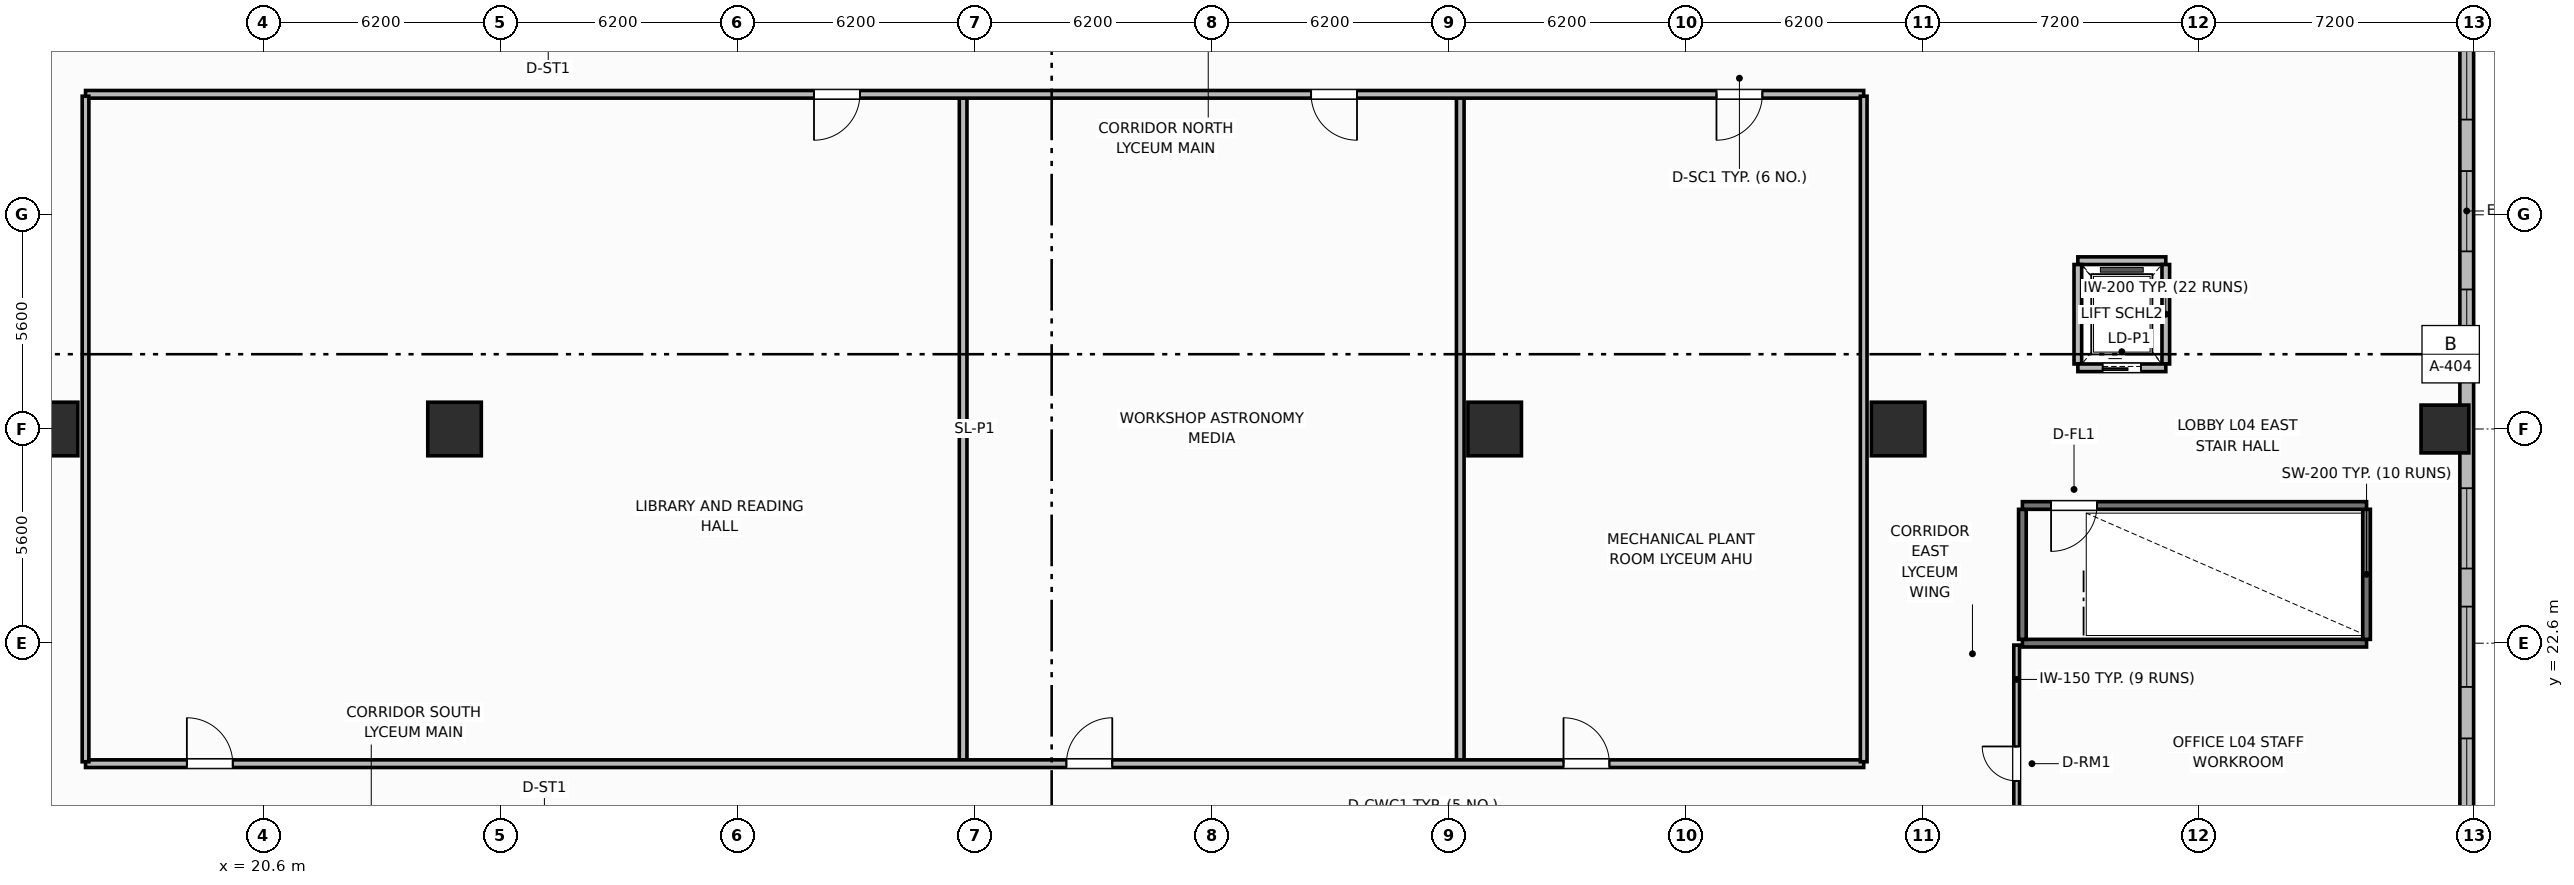
"""IFC4 building model, lengths in metres.
Left out: names, types, materials, properties, quantities, classifications, styles, units other than length and angle.
Written with IfcOpenShell. Run it as: python <this file> out.ifc"""

import sys

from ifc_helpers import new_model, si_unit, direction, frame, frame_2d, origin, origin_2d, place, context, subcontext, project, spatial, rectangle, extrude, element, fill, save


model = new_model("IFC4")
c1 = context("Model", 3, precision=1e-05, world=origin(), true_north=direction((0.0, 1.0)))
c2 = subcontext(c1, "Body", "Model", "MODEL_VIEW")
j1 = project(units=[si_unit("LENGTHUNIT", "METRE"), si_unit("PLANEANGLEUNIT", "RADIAN")], contexts=[c1])
p1 = place(None, origin())
s1 = spatial("IfcSite", under=j1, at=p1, CompositionType="ELEMENT")
p2 = place(p1, origin())
s2 = spatial("IfcBuilding", under=s1, at=p2, CompositionType="ELEMENT")
p3 = place(p2, frame((0.0, 0.0, 20.1)))
s3 = spatial("IfcBuildingStorey", under=s2, at=p3, CompositionType="ELEMENT", Elevation=20.1)
for number, where, z_axis, x_axis in (
    (1, (25.6, 28.2, 0.0), (0.0, 0.0, 1.0), (1.0, 0.0, 0.0)),
    (2, (52.8, 28.2, 0.0), (0.0, 0.0, 1.0), (1.0, 0.0, 0.0)),
):
    element("IfcColumn", number, at=place(p3, frame(where, z_axis=z_axis, x_axis=x_axis)), inside=s3, PredefinedType="COLUMN", context=c2, shape_type="SweptSolid", body=[
        extrude(rectangle(XDim=1.4, YDim=1.4, at=origin_2d()), origin(), (0.0, 0.0, 1.0), 4.5),
    ])
p4 = place(p3, frame((77.65, 28.2, 0.0), z_axis=(0.0, 0.0, 1.0), x_axis=(1.0, 0.0, 0.0)))
e3 = element("IfcColumn", 3, at=p4, inside=s3, PredefinedType="COLUMN", context=c2, shape_type="SweptSolid", body=[
    extrude(rectangle(XDim=1.25, YDim=1.25, at=origin_2d()), origin(), (0.0, 0.0, 1.0), 4.5),
])
for number, where, z_axis, x_axis in (
    (4, (15.05, 28.2, 0.0), (0.0, 0.0, 1.0), (1.0, 0.0, 0.0)),
    (5, (63.35, 28.2, 0.0), (0.0, 0.0, 1.0), (1.0, 0.0, 0.0)),
):
    element("IfcColumn", number, at=place(p3, frame(where, z_axis=z_axis, x_axis=x_axis)), inside=s3, PredefinedType="COLUMN", context=c2, shape_type="SweptSolid", body=[
        extrude(rectangle(XDim=1.4, YDim=1.4, at=origin_2d()), origin(), (0.0, 0.0, 1.0), 4.5),
    ])
p5 = place(p3, frame((78.22, 0.98, 0.0), z_axis=(0.0, 0.0, 1.0), x_axis=(0.0, 1.0, 0.0)))
e6 = element("IfcWall", 6, at=p5, inside=s3, PredefinedType="SOLIDWALL", context=c2, shape_type="SweptSolid", body=[
    extrude(rectangle(XDim=54.44, YDim=0.36, at=frame_2d((27.22, 0.0))), origin(), (0.0, 0.0, 1.0), 2.3),
])
p6 = place(p5, frame((1.498, 0.0, 0.3)))
e7 = element("IfcOpeningElement", 7, at=p6, cuts=e6, PredefinedType="OPENING", context=c2, shape_type="SweptSolid", body=[
    extrude(rectangle(XDim=2.1, YDim=2.2, at=frame_2d((1.05, 1.1))), frame((0.0, 0.19, 0.0), z_axis=(0.0, -1.0, 0.0), x_axis=(1.0, 0.0, 0.0)), (0.0, 0.0, 1.0), 0.38),
])
p7 = place(p5, frame((5.294, 0.0, 0.3)))
e8 = element("IfcOpeningElement", 8, at=p7, cuts=e6, PredefinedType="OPENING", context=c2, shape_type="SweptSolid", body=[
    extrude(rectangle(XDim=2.1, YDim=2.2, at=frame_2d((1.05, 1.1))), frame((0.0, 0.19, 0.0), z_axis=(0.0, -1.0, 0.0), x_axis=(1.0, 0.0, 0.0)), (0.0, 0.0, 1.0), 0.38),
])
p8 = place(p5, frame((12.185, 0.0, 0.3)))
e9 = element("IfcOpeningElement", 9, at=p8, cuts=e6, PredefinedType="OPENING", context=c2, shape_type="SweptSolid", body=[
    extrude(rectangle(XDim=2.1, YDim=2.2, at=frame_2d((1.05, 1.1))), frame((0.0, 0.19, 0.0), z_axis=(0.0, -1.0, 0.0), x_axis=(1.0, 0.0, 0.0)), (0.0, 0.0, 1.0), 0.38),
])
p9 = place(p5, frame((17.031, 0.0, 0.3)))
e10 = element("IfcOpeningElement", 10, at=p9, cuts=e6, PredefinedType="OPENING", context=c2, shape_type="SweptSolid", body=[
    extrude(rectangle(XDim=2.1, YDim=2.2, at=frame_2d((1.05, 1.1))), frame((0.0, 0.19, 0.0), z_axis=(0.0, -1.0, 0.0), x_axis=(1.0, 0.0, 0.0)), (0.0, 0.0, 1.0), 0.38),
])
p10 = place(p5, frame((20.476, 0.0, 0.3)))
e11 = element("IfcOpeningElement", 11, at=p10, cuts=e6, PredefinedType="OPENING", context=c2, shape_type="SweptSolid", body=[
    extrude(rectangle(XDim=2.1, YDim=2.2, at=frame_2d((1.05, 1.1))), frame((0.0, 0.19, 0.0), z_axis=(0.0, -1.0, 0.0), x_axis=(1.0, 0.0, 0.0)), (0.0, 0.0, 1.0), 0.38),
])
p11 = place(p5, frame((23.572, 0.0, 0.3)))
e12 = element("IfcOpeningElement", 12, at=p11, cuts=e6, PredefinedType="OPENING", context=c2, shape_type="SweptSolid", body=[
    extrude(rectangle(XDim=2.1, YDim=2.2, at=frame_2d((1.05, 1.1))), frame((0.0, 0.19, 0.0), z_axis=(0.0, -1.0, 0.0), x_axis=(1.0, 0.0, 0.0)), (0.0, 0.0, 1.0), 0.38),
])
p12 = place(p5, frame((28.768, 0.0, 0.3)))
e13 = element("IfcOpeningElement", 13, at=p12, cuts=e6, PredefinedType="OPENING", context=c2, shape_type="SweptSolid", body=[
    extrude(rectangle(XDim=2.1, YDim=2.2, at=frame_2d((1.05, 1.1))), frame((0.0, 0.19, 0.0), z_axis=(0.0, -1.0, 0.0), x_axis=(1.0, 0.0, 0.0)), (0.0, 0.0, 1.0), 0.38),
])
p13 = place(p5, frame((31.864, 0.0, 0.3)))
e14 = element("IfcOpeningElement", 14, at=p13, cuts=e6, PredefinedType="OPENING", context=c2, shape_type="SweptSolid", body=[
    extrude(rectangle(XDim=2.1, YDim=2.2, at=frame_2d((1.05, 1.1))), frame((0.0, 0.19, 0.0), z_axis=(0.0, -1.0, 0.0), x_axis=(1.0, 0.0, 0.0)), (0.0, 0.0, 1.0), 0.38),
])
p14 = place(p5, frame((35.309, 0.0, 0.3)))
e15 = element("IfcOpeningElement", 15, at=p14, cuts=e6, PredefinedType="OPENING", context=c2, shape_type="SweptSolid", body=[
    extrude(rectangle(XDim=2.1, YDim=2.2, at=frame_2d((1.05, 1.1))), frame((0.0, 0.19, 0.0), z_axis=(0.0, -1.0, 0.0), x_axis=(1.0, 0.0, 0.0)), (0.0, 0.0, 1.0), 0.38),
])
p15 = place(p5, frame((40.155, 0.0, 0.3)))
e16 = element("IfcOpeningElement", 16, at=p15, cuts=e6, PredefinedType="OPENING", context=c2, shape_type="SweptSolid", body=[
    extrude(rectangle(XDim=2.1, YDim=2.2, at=frame_2d((1.05, 1.1))), frame((0.0, 0.19, 0.0), z_axis=(0.0, -1.0, 0.0), x_axis=(1.0, 0.0, 0.0)), (0.0, 0.0, 1.0), 0.38),
])
p16 = place(p5, frame((47.046, 0.0, 0.3)))
e17 = element("IfcOpeningElement", 17, at=p16, cuts=e6, PredefinedType="OPENING", context=c2, shape_type="SweptSolid", body=[
    extrude(rectangle(XDim=2.1, YDim=2.2, at=frame_2d((1.05, 1.1))), frame((0.0, 0.19, 0.0), z_axis=(0.0, -1.0, 0.0), x_axis=(1.0, 0.0, 0.0)), (0.0, 0.0, 1.0), 0.38),
])
p17 = place(p5, frame((50.842, 0.0, 0.3)))
e18 = element("IfcOpeningElement", 18, at=p17, cuts=e6, PredefinedType="OPENING", context=c2, shape_type="SweptSolid", body=[
    extrude(rectangle(XDim=2.1, YDim=2.2, at=frame_2d((1.05, 1.1))), frame((0.0, 0.19, 0.0), z_axis=(0.0, -1.0, 0.0), x_axis=(1.0, 0.0, 0.0)), (0.0, 0.0, 1.0), 0.38),
])
p18 = place(p3, frame((66.6, 22.6, 0.0), z_axis=(0.0, 0.0, 1.0), x_axis=(1.0, 0.0, 0.0)))
e19 = element("IfcWall", 19, at=p18, inside=s3, PredefinedType="SHEAR", context=c2, shape_type="SweptSolid", body=[
    extrude(rectangle(XDim=9.0, YDim=0.2, at=frame_2d((4.5, 0.0))), origin(), (0.0, 0.0, 1.0), 4.5),
])
for number, where, z_axis, x_axis in (
    (20, (66.6, 22.7, 0.0), (0.0, 0.0, 1.0), (0.0, 1.0, 0.0)),
    (21, (75.6, 22.7, 0.0), (0.0, 0.0, 1.0), (0.0, 1.0, 0.0)),
):
    element("IfcWall", number, at=place(p3, frame(where, z_axis=z_axis, x_axis=x_axis)), inside=s3, PredefinedType="SHEAR", context=c2, shape_type="SweptSolid", body=[
        extrude(rectangle(XDim=3.4, YDim=0.2, at=frame_2d((1.7, 0.0))), origin(), (0.0, 0.0, 1.0), 4.5),
    ])
p19 = place(p3, frame((75.6, 26.2, 0.0), z_axis=(0.0, 0.0, 1.0), x_axis=(-1.0, 0.0, 0.0)))
e22 = element("IfcWall", 22, at=p19, inside=s3, PredefinedType="SHEAR", context=c2, shape_type="SweptSolid", body=[
    extrude(rectangle(XDim=9.0, YDim=0.2, at=frame_2d((4.5, 0.0))), origin(), (0.0, 0.0, 1.0), 4.5),
])
p20 = place(p19, frame((7.05, 0.0, 0.0)))
e23 = element("IfcOpeningElement", 23, at=p20, cuts=e22, PredefinedType="OPENING", context=c2, shape_type="SweptSolid", body=[
    extrude(rectangle(XDim=1.2, YDim=2.15, at=frame_2d((0.6, 1.075))), frame((0.0, 0.11, 0.0), z_axis=(0.0, -1.0, 0.0), x_axis=(1.0, 0.0, 0.0)), (0.0, 0.0, 1.0), 0.22),
])
p21 = place(p3, frame((68.05, 32.6, 0.0), z_axis=(0.0, 0.0, 1.0), x_axis=(1.0, 0.0, 0.0)))
e24 = element("IfcWall", 24, at=p21, inside=s3, PredefinedType="PARTITIONING", context=c2, shape_type="SweptSolid", body=[
    extrude(rectangle(XDim=2.3, YDim=0.2, at=frame_2d((1.15, 0.0))), origin(), (0.0, 0.0, 1.0), 2.26),
])
for number, where, z_axis, x_axis in (
    (25, (68.05, 29.9, 0.0), (0.0, 0.0, 1.0), (0.0, 1.0, 0.0)),
    (26, (70.35, 29.9, 0.0), (0.0, 0.0, 1.0), (0.0, 1.0, 0.0)),
):
    element("IfcWall", number, at=place(p3, frame(where, z_axis=z_axis, x_axis=x_axis)), inside=s3, PredefinedType="PARTITIONING", context=c2, shape_type="SweptSolid", body=[
        extrude(rectangle(XDim=2.6, YDim=0.2, at=frame_2d((1.3, 0.0))), origin(), (0.0, 0.0, 1.0), 2.26),
    ])
p22 = place(p3, frame((68.05, 29.8, 0.0), z_axis=(0.0, 0.0, 1.0), x_axis=(1.0, 0.0, 0.0)))
e27 = element("IfcWall", 27, at=p22, inside=s3, PredefinedType="PARTITIONING", context=c2, shape_type="SweptSolid", body=[
    extrude(rectangle(XDim=2.3, YDim=0.2, at=frame_2d((1.15, 0.0))), origin(), (0.0, 0.0, 1.0), 2.26),
])
p23 = place(p22, frame((0.65, 0.0, 0.0)))
e28 = element("IfcOpeningElement", 28, at=p23, cuts=e27, PredefinedType="OPENING", context=c2, shape_type="SweptSolid", body=[
    extrude(rectangle(XDim=1.0, YDim=2.15, at=frame_2d((0.5, 1.075))), frame((0.0, 0.11, 0.0), z_axis=(0.0, -1.0, 0.0), x_axis=(1.0, 0.0, 0.0)), (0.0, 0.0, 1.0), 0.22),
])
for number, where, z_axis, x_axis in (
    (29, (38.9, 19.5, 0.0), (0.0, 0.0, 1.0), (0.0, 1.0, 0.0)),
    (30, (51.9, 19.5, 0.0), (0.0, 0.0, 1.0), (0.0, 1.0, 0.0)),
):
    element("IfcWall", number, at=place(p3, frame(where, z_axis=z_axis, x_axis=x_axis)), inside=s3, PredefinedType="PARTITIONING", context=c2, shape_type="SweptSolid", body=[
        extrude(rectangle(XDim=17.4, YDim=0.2, at=frame_2d((8.7, 0.0))), origin(), (0.0, 0.0, 1.0), 2.26),
    ])
p24 = place(p3, frame((15.95, 19.45, 0.0), z_axis=(0.0, 0.0, 1.0), x_axis=(1.0, 0.0, 0.0)))
e31 = element("IfcWall", 31, at=p24, inside=s3, PredefinedType="PARTITIONING", context=c2, shape_type="SweptSolid", body=[
    extrude(rectangle(XDim=46.5, YDim=0.2, at=frame_2d((23.25, 0.0))), origin(), (0.0, 0.0, 1.0), 2.26),
])
p25 = place(p24, frame((2.65, 0.0, 0.0)))
e32 = element("IfcOpeningElement", 32, at=p25, cuts=e31, PredefinedType="OPENING", context=c2, shape_type="SweptSolid", body=[
    extrude(rectangle(XDim=1.2, YDim=2.15, at=frame_2d((0.6, 1.075))), frame((0.0, 0.11, 0.0), z_axis=(0.0, -1.0, 0.0), x_axis=(1.0, 0.0, 0.0)), (0.0, 0.0, 1.0), 0.22),
])
p26 = place(p24, frame((25.65, 0.0, 0.0)))
e33 = element("IfcOpeningElement", 33, at=p26, cuts=e31, PredefinedType="OPENING", context=c2, shape_type="SweptSolid", body=[
    extrude(rectangle(XDim=1.2, YDim=2.15, at=frame_2d((0.6, 1.075))), frame((0.0, 0.11, 0.0), z_axis=(0.0, -1.0, 0.0), x_axis=(1.0, 0.0, 0.0)), (0.0, 0.0, 1.0), 0.22),
])
p27 = place(p24, frame((38.65, 0.0, 0.0)))
e34 = element("IfcOpeningElement", 34, at=p27, cuts=e31, PredefinedType="OPENING", context=c2, shape_type="SweptSolid", body=[
    extrude(rectangle(XDim=1.2, YDim=2.15, at=frame_2d((0.6, 1.075))), frame((0.0, 0.11, 0.0), z_axis=(0.0, -1.0, 0.0), x_axis=(1.0, 0.0, 0.0)), (0.0, 0.0, 1.0), 0.22),
])
p28 = place(p3, frame((62.45, 36.95, 0.0), z_axis=(0.0, 0.0, 1.0), x_axis=(-1.0, 0.0, 0.0)))
e35 = element("IfcWall", 35, at=p28, inside=s3, PredefinedType="PARTITIONING", context=c2, shape_type="SweptSolid", body=[
    extrude(rectangle(XDim=46.5, YDim=0.2, at=frame_2d((23.25, 0.0))), origin(), (0.0, 0.0, 1.0), 2.26),
])
p29 = place(p28, frame((26.25, 0.0, 0.0)))
e36 = element("IfcOpeningElement", 36, at=p29, cuts=e35, PredefinedType="OPENING", context=c2, shape_type="SweptSolid", body=[
    extrude(rectangle(XDim=1.2, YDim=2.15, at=frame_2d((0.6, 1.075))), frame((0.0, 0.11, 0.0), z_axis=(0.0, -1.0, 0.0), x_axis=(1.0, 0.0, 0.0)), (0.0, 0.0, 1.0), 0.22),
])
p30 = place(p28, frame((13.25, 0.0, 0.0)))
e37 = element("IfcOpeningElement", 37, at=p30, cuts=e35, PredefinedType="OPENING", context=c2, shape_type="SweptSolid", body=[
    extrude(rectangle(XDim=1.2, YDim=2.15, at=frame_2d((0.6, 1.075))), frame((0.0, 0.11, 0.0), z_axis=(0.0, -1.0, 0.0), x_axis=(1.0, 0.0, 0.0)), (0.0, 0.0, 1.0), 0.22),
])
p31 = place(p28, frame((2.65, 0.0, 0.0)))
e38 = element("IfcOpeningElement", 38, at=p31, cuts=e35, PredefinedType="OPENING", context=c2, shape_type="SweptSolid", body=[
    extrude(rectangle(XDim=1.2, YDim=2.15, at=frame_2d((0.6, 1.075))), frame((0.0, 0.11, 0.0), z_axis=(0.0, -1.0, 0.0), x_axis=(1.0, 0.0, 0.0)), (0.0, 0.0, 1.0), 0.22),
])
for number, where, z_axis, x_axis in (
    (39, (15.95, 19.5, 0.0), (0.0, 0.0, 1.0), (0.0, 1.0, 0.0)),
    (40, (62.45, 19.5, 0.0), (0.0, 0.0, 1.0), (0.0, 1.0, 0.0)),
):
    element("IfcWall", number, at=place(p3, frame(where, z_axis=z_axis, x_axis=x_axis)), inside=s3, PredefinedType="PARTITIONING", context=c2, shape_type="SweptSolid", body=[
        extrude(rectangle(XDim=17.4, YDim=0.175, at=frame_2d((8.7, 0.0))), origin(), (0.0, 0.0, 1.0), 2.26),
    ])
p32 = place(p3, frame((66.45, 16.9, 0.0), z_axis=(0.0, 0.0, 1.0), x_axis=(0.0, 1.0, 0.0)))
e41 = element("IfcWall", 41, at=p32, inside=s3, PredefinedType="PARTITIONING", context=c2, shape_type="SweptSolid", body=[
    extrude(rectangle(XDim=5.65, YDim=0.15, at=frame_2d((2.825, 0.0))), origin(), (0.0, 0.0, 1.0), 2.26),
])
p33 = place(p32, frame((2.1, 0.0, 0.0)))
e42 = element("IfcOpeningElement", 42, at=p33, cuts=e41, PredefinedType="OPENING", context=c2, shape_type="SweptSolid", body=[
    extrude(rectangle(XDim=0.9, YDim=2.1, at=frame_2d((0.45, 1.05))), frame((0.0, 0.085, 0.0), z_axis=(0.0, -1.0, 0.0), x_axis=(1.0, 0.0, 0.0)), (0.0, 0.0, 1.0), 0.17),
])
p34 = place(p9, origin())
e43 = element("IfcWindow", 43, at=p34, inside=s3, PartitioningType="SINGLE_PANEL", PredefinedType="WINDOW", context=c2, shape_type="SweptSolid", body=[
    extrude(rectangle(XDim=2.1, YDim=2.2, at=frame_2d((1.05, 1.1))), frame((0.0, 0.03, 0.0), z_axis=(0.0, -1.0, 0.0), x_axis=(1.0, 0.0, 0.0)), (0.0, 0.0, 1.0), 0.06),
])
fill(e10, e43)
p35 = place(p10, origin())
e44 = element("IfcWindow", 44, at=p35, inside=s3, PartitioningType="SINGLE_PANEL", PredefinedType="WINDOW", context=c2, shape_type="SweptSolid", body=[
    extrude(rectangle(XDim=2.1, YDim=2.2, at=frame_2d((1.05, 1.1))), frame((0.0, 0.03, 0.0), z_axis=(0.0, -1.0, 0.0), x_axis=(1.0, 0.0, 0.0)), (0.0, 0.0, 1.0), 0.06),
])
fill(e11, e44)
p36 = place(p11, origin())
e45 = element("IfcWindow", 45, at=p36, inside=s3, PartitioningType="SINGLE_PANEL", PredefinedType="WINDOW", context=c2, shape_type="SweptSolid", body=[
    extrude(rectangle(XDim=2.1, YDim=2.2, at=frame_2d((1.05, 1.1))), frame((0.0, 0.03, 0.0), z_axis=(0.0, -1.0, 0.0), x_axis=(1.0, 0.0, 0.0)), (0.0, 0.0, 1.0), 0.06),
])
fill(e12, e45)
p37 = place(p12, origin())
e46 = element("IfcWindow", 46, at=p37, inside=s3, PartitioningType="SINGLE_PANEL", PredefinedType="WINDOW", context=c2, shape_type="SweptSolid", body=[
    extrude(rectangle(XDim=2.1, YDim=2.2, at=frame_2d((1.05, 1.1))), frame((0.0, 0.03, 0.0), z_axis=(0.0, -1.0, 0.0), x_axis=(1.0, 0.0, 0.0)), (0.0, 0.0, 1.0), 0.06),
])
fill(e13, e46)
p38 = place(p13, origin())
e47 = element("IfcWindow", 47, at=p38, inside=s3, PartitioningType="SINGLE_PANEL", PredefinedType="WINDOW", context=c2, shape_type="SweptSolid", body=[
    extrude(rectangle(XDim=2.1, YDim=2.2, at=frame_2d((1.05, 1.1))), frame((0.0, 0.03, 0.0), z_axis=(0.0, -1.0, 0.0), x_axis=(1.0, 0.0, 0.0)), (0.0, 0.0, 1.0), 0.06),
])
fill(e14, e47)
p39 = place(p14, origin())
e48 = element("IfcWindow", 48, at=p39, inside=s3, PartitioningType="SINGLE_PANEL", PredefinedType="WINDOW", context=c2, shape_type="SweptSolid", body=[
    extrude(rectangle(XDim=2.1, YDim=2.2, at=frame_2d((1.05, 1.1))), frame((0.0, 0.03, 0.0), z_axis=(0.0, -1.0, 0.0), x_axis=(1.0, 0.0, 0.0)), (0.0, 0.0, 1.0), 0.06),
])
fill(e15, e48)
p40 = place(p20, origin())
e49 = element("IfcDoor", 49, at=p40, inside=s3, OperationType="SINGLE_SWING_RIGHT", PredefinedType="DOOR", context=c2, shape_type="SweptSolid", body=[
    extrude(rectangle(XDim=1.2, YDim=2.15, at=frame_2d((0.6, 1.075))), frame((0.0, 0.025, 0.0), z_axis=(0.0, -1.0, 0.0), x_axis=(1.0, 0.0, 0.0)), (0.0, 0.0, 1.0), 0.05),
])
fill(e23, e49)
p41 = place(p23, origin())
e50 = element("IfcDoor", 50, at=p41, inside=s3, OperationType="SLIDING_TO_LEFT", PredefinedType="DOOR", context=c2, shape_type="SweptSolid", body=[
    extrude(rectangle(XDim=1.0, YDim=2.15, at=frame_2d((0.5, 1.075))), frame((0.0, 0.025, 0.0), z_axis=(0.0, -1.0, 0.0), x_axis=(1.0, 0.0, 0.0)), (0.0, 0.0, 1.0), 0.05),
])
fill(e28, e50)
p42 = place(p25, origin())
e51 = element("IfcDoor", 51, at=p42, inside=s3, OperationType="SINGLE_SWING_LEFT", PredefinedType="DOOR", context=c2, shape_type="SweptSolid", body=[
    extrude(rectangle(XDim=1.2, YDim=2.15, at=frame_2d((0.6, 1.075))), frame((0.0, 0.025, 0.0), z_axis=(0.0, -1.0, 0.0), x_axis=(1.0, 0.0, 0.0)), (0.0, 0.0, 1.0), 0.05),
])
fill(e32, e51)
p43 = place(p26, origin())
e52 = element("IfcDoor", 52, at=p43, inside=s3, OperationType="SINGLE_SWING_RIGHT", PredefinedType="DOOR", context=c2, shape_type="SweptSolid", body=[
    extrude(rectangle(XDim=1.2, YDim=2.15, at=frame_2d((0.6, 1.075))), frame((0.0, 0.025, 0.0), z_axis=(0.0, -1.0, 0.0), x_axis=(1.0, 0.0, 0.0)), (0.0, 0.0, 1.0), 0.05),
])
fill(e33, e52)
p44 = place(p27, origin())
e53 = element("IfcDoor", 53, at=p44, inside=s3, OperationType="SINGLE_SWING_LEFT", PredefinedType="DOOR", context=c2, shape_type="SweptSolid", body=[
    extrude(rectangle(XDim=1.2, YDim=2.15, at=frame_2d((0.6, 1.075))), frame((0.0, 0.025, 0.0), z_axis=(0.0, -1.0, 0.0), x_axis=(1.0, 0.0, 0.0)), (0.0, 0.0, 1.0), 0.05),
])
fill(e34, e53)
p45 = place(p29, origin())
e54 = element("IfcDoor", 54, at=p45, inside=s3, OperationType="SINGLE_SWING_RIGHT", PredefinedType="DOOR", context=c2, shape_type="SweptSolid", body=[
    extrude(rectangle(XDim=1.2, YDim=2.15, at=frame_2d((0.6, 1.075))), frame((0.0, 0.025, 0.0), z_axis=(0.0, -1.0, 0.0), x_axis=(1.0, 0.0, 0.0)), (0.0, 0.0, 1.0), 0.05),
])
fill(e36, e54)
p46 = place(p30, origin())
e55 = element("IfcDoor", 55, at=p46, inside=s3, OperationType="SINGLE_SWING_LEFT", PredefinedType="DOOR", context=c2, shape_type="SweptSolid", body=[
    extrude(rectangle(XDim=1.2, YDim=2.15, at=frame_2d((0.6, 1.075))), frame((0.0, 0.025, 0.0), z_axis=(0.0, -1.0, 0.0), x_axis=(1.0, 0.0, 0.0)), (0.0, 0.0, 1.0), 0.05),
])
fill(e37, e55)
p47 = place(p31, origin())
e56 = element("IfcDoor", 56, at=p47, inside=s3, OperationType="SINGLE_SWING_RIGHT", PredefinedType="DOOR", context=c2, shape_type="SweptSolid", body=[
    extrude(rectangle(XDim=1.2, YDim=2.15, at=frame_2d((0.6, 1.075))), frame((0.0, 0.025, 0.0), z_axis=(0.0, -1.0, 0.0), x_axis=(1.0, 0.0, 0.0)), (0.0, 0.0, 1.0), 0.05),
])
fill(e38, e56)
p48 = place(p33, origin())
e57 = element("IfcDoor", 57, at=p48, inside=s3, OperationType="SINGLE_SWING_RIGHT", PredefinedType="DOOR", context=c2, shape_type="SweptSolid", body=[
    extrude(rectangle(XDim=0.9, YDim=2.1, at=frame_2d((0.45, 1.05))), frame((0.0, 0.025, 0.0), z_axis=(0.0, -1.0, 0.0), x_axis=(1.0, 0.0, 0.0)), (0.0, 0.0, 1.0), 0.05),
])
fill(e42, e57)
save(model, sys.argv[1])
